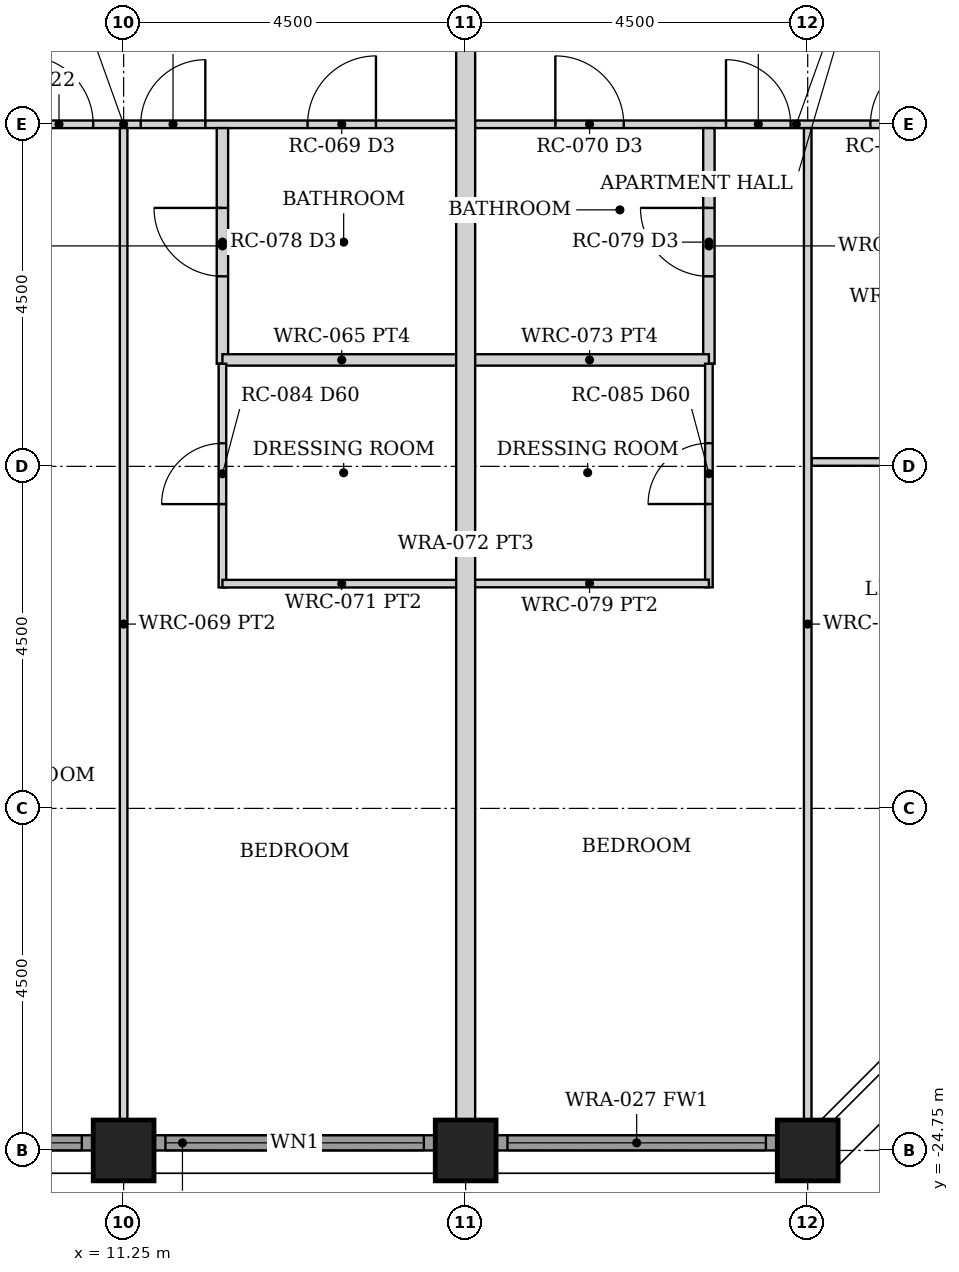
"""IFC4 building model, lengths in metres.
Left out: names, types, materials, properties, quantities, classifications, styles, units other than length and angle.
Written with IfcOpenShell. Run it as: python <this file> out.ifc"""

import sys

from ifc_helpers import new_model, si_unit, direction, frame, frame_2d, origin, origin_2d, place, context, subcontext, project, spatial, rectangle, hollow_rectangle, extrude, element, fill, save


model = new_model("IFC4")
c1 = context("Model", 3, precision=1e-05, world=origin(), true_north=direction((0.0, 1.0)))
c2 = subcontext(c1, "Body", "Model", "MODEL_VIEW")
j1 = project(units=[si_unit("LENGTHUNIT", "METRE"), si_unit("PLANEANGLEUNIT", "RADIAN")], contexts=[c1])
p1 = place(None, origin())
s1 = spatial("IfcSite", under=j1, at=p1, CompositionType="ELEMENT")
p2 = place(p1, origin())
s2 = spatial("IfcBuilding", under=s1, at=p2, CompositionType="ELEMENT")
p3 = place(p2, frame((0.0, 0.0, 47.5)))
s3 = spatial("IfcBuildingStorey", under=s2, at=p3, CompositionType="ELEMENT", Elevation=47.5)
for number, where, z_axis, x_axis in (
    (1, (11.25, -24.75, 0.0), (0.0, 0.0, 1.0), (0.0, 1.0, 0.0)),
    (2, (15.75, -24.75, 0.0), (0.0, 0.0, 1.0), (0.0, 1.0, 0.0)),
    (3, (20.25, -24.75, 0.0), (0.0, 0.0, 1.0), (0.0, 1.0, 0.0)),
):
    element("IfcColumn", number, at=place(p3, frame(where, z_axis=z_axis, x_axis=x_axis)), inside=s3, PredefinedType="COLUMN", context=c2, shape_type="SweptSolid", body=[
        extrude(hollow_rectangle(XDim=0.8, YDim=0.8, WallThickness=0.07, at=origin_2d()), origin(), (0.0, 0.0, 1.0), 3.5),
    ])
p4 = place(p3, frame((7.155, -24.65, 0.0), z_axis=(0.0, 0.0, 1.0), x_axis=(1.0, 0.0, 0.0)))
e4 = element("IfcWall", 4, at=p4, inside=s3, PredefinedType="SOLIDWALL", context=c2, shape_type="SweptSolid", body=[
    extrude(rectangle(XDim=3.69, YDim=0.2, at=frame_2d((1.845, 0.0))), origin(), (0.0, 0.0, 1.0), 2.379),
])
p5 = place(p4, frame((0.145, 0.0, 0.3)))
e5 = element("IfcOpeningElement", 5, at=p5, cuts=e4, PredefinedType="OPENING", context=c2, shape_type="SweptSolid", body=[
    extrude(rectangle(XDim=3.4, YDim=1.929, at=frame_2d((1.7, 0.964))), frame((0.0, 0.11, 0.0), z_axis=(0.0, -1.0, 0.0), x_axis=(1.0, 0.0, 0.0)), (0.0, 0.0, 1.0), 0.22),
])
p6 = place(p3, frame((11.655, -24.65, 0.0), z_axis=(0.0, 0.0, 1.0), x_axis=(1.0, 0.0, 0.0)))
e6 = element("IfcWall", 6, at=p6, inside=s3, PredefinedType="SOLIDWALL", context=c2, shape_type="SweptSolid", body=[
    extrude(rectangle(XDim=3.69, YDim=0.2, at=frame_2d((1.845, 0.0))), origin(), (0.0, 0.0, 1.0), 2.379),
])
p7 = place(p6, frame((0.145, 0.0, 0.3)))
e7 = element("IfcOpeningElement", 7, at=p7, cuts=e6, PredefinedType="OPENING", context=c2, shape_type="SweptSolid", body=[
    extrude(rectangle(XDim=3.4, YDim=1.929, at=frame_2d((1.7, 0.964))), frame((0.0, 0.11, 0.0), z_axis=(0.0, -1.0, 0.0), x_axis=(1.0, 0.0, 0.0)), (0.0, 0.0, 1.0), 0.22),
])
p8 = place(p3, frame((16.155, -24.65, 0.0), z_axis=(0.0, 0.0, 1.0), x_axis=(1.0, 0.0, 0.0)))
e8 = element("IfcWall", 8, at=p8, inside=s3, PredefinedType="SOLIDWALL", context=c2, shape_type="SweptSolid", body=[
    extrude(rectangle(XDim=3.69, YDim=0.2, at=frame_2d((1.845, 0.0))), origin(), (0.0, 0.0, 1.0), 2.379),
])
p9 = place(p8, frame((0.145, 0.0, 0.3)))
e9 = element("IfcOpeningElement", 9, at=p9, cuts=e8, PredefinedType="OPENING", context=c2, shape_type="SweptSolid", body=[
    extrude(rectangle(XDim=3.4, YDim=1.929, at=frame_2d((1.7, 0.964))), frame((0.0, 0.11, 0.0), z_axis=(0.0, -1.0, 0.0), x_axis=(1.0, 0.0, 0.0)), (0.0, 0.0, 1.0), 0.22),
])
p10 = place(p3, frame((6.85, -11.25, 0.0), z_axis=(0.0, 0.0, 1.0), x_axis=(1.0, 0.0, 0.0)))
e10 = element("IfcWall", 10, at=p10, inside=s3, PredefinedType="PARTITIONING", context=c2, shape_type="SweptSolid", body=[
    extrude(rectangle(XDim=8.8, YDim=0.1, at=frame_2d((4.4, 0.0))), origin(), (0.0, 0.0, 1.0), 2.373),
])
p11 = place(p10, frame((0.85, 0.0, 0.0)))
e11 = element("IfcOpeningElement", 11, at=p11, cuts=e10, PredefinedType="OPENING", context=c2, shape_type="SweptSolid", body=[
    extrude(rectangle(XDim=0.9, YDim=2.1, at=frame_2d((0.45, 1.05))), frame((0.0, 0.06, 0.0), z_axis=(0.0, -1.0, 0.0), x_axis=(1.0, 0.0, 0.0)), (0.0, 0.0, 1.0), 0.12),
])
p12 = place(p10, frame((3.1, 0.0, 0.0)))
e12 = element("IfcOpeningElement", 12, at=p12, cuts=e10, PredefinedType="OPENING", context=c2, shape_type="SweptSolid", body=[
    extrude(rectangle(XDim=0.9, YDim=2.1, at=frame_2d((0.45, 1.05))), frame((0.0, 0.06, 0.0), z_axis=(0.0, -1.0, 0.0), x_axis=(1.0, 0.0, 0.0)), (0.0, 0.0, 1.0), 0.12),
])
p13 = place(p10, frame((4.625, 0.0, 0.0)))
e13 = element("IfcOpeningElement", 13, at=p13, cuts=e10, PredefinedType="OPENING", context=c2, shape_type="SweptSolid", body=[
    extrude(rectangle(XDim=0.85, YDim=2.1, at=frame_2d((0.425, 1.05))), frame((0.0, 0.06, 0.0), z_axis=(0.0, -1.0, 0.0), x_axis=(1.0, 0.0, 0.0)), (0.0, 0.0, 1.0), 0.12),
])
p14 = place(p10, frame((6.82, 0.0, 0.0)))
e14 = element("IfcOpeningElement", 14, at=p14, cuts=e10, PredefinedType="OPENING", context=c2, shape_type="SweptSolid", body=[
    extrude(rectangle(XDim=0.9, YDim=2.1, at=frame_2d((0.45, 1.05))), frame((0.0, 0.06, 0.0), z_axis=(0.0, -1.0, 0.0), x_axis=(1.0, 0.0, 0.0)), (0.0, 0.0, 1.0), 0.12),
])
p15 = place(p3, frame((11.25, -24.35, 0.0), z_axis=(0.0, 0.0, 1.0), x_axis=(0.0, 1.0, 0.0)))
e15 = element("IfcWall", 15, at=p15, inside=s3, PredefinedType="PARTITIONING", context=c2, shape_type="SweptSolid", body=[
    extrude(rectangle(XDim=13.05, YDim=0.1, at=frame_2d((6.525, 0.0))), origin(), (0.0, 0.0, 1.0), 2.373),
])
p16 = place(p3, frame((12.55, -14.4, 0.0), z_axis=(0.0, 0.0, 1.0), x_axis=(0.0, 1.0, 0.0)))
e16 = element("IfcWall", 16, at=p16, inside=s3, PredefinedType="PARTITIONING", context=c2, shape_type="SweptSolid", body=[
    extrude(rectangle(XDim=3.1, YDim=0.15, at=frame_2d((1.55, 0.0))), origin(), (0.0, 0.0, 1.0), 2.373),
])
p17 = place(p16, frame((1.15, 0.0, 0.0)))
e17 = element("IfcOpeningElement", 17, at=p17, cuts=e16, PredefinedType="OPENING", context=c2, shape_type="SweptSolid", body=[
    extrude(rectangle(XDim=0.9, YDim=2.1, at=frame_2d((0.45, 1.05))), frame((0.0, 0.085, 0.0), z_axis=(0.0, -1.0, 0.0), x_axis=(1.0, 0.0, 0.0)), (0.0, 0.0, 1.0), 0.17),
])
p18 = place(p3, frame((12.55, -14.35, 0.0), z_axis=(0.0, 0.0, 1.0), x_axis=(1.0, 0.0, 0.0)))
e18 = element("IfcWall", 18, at=p18, inside=s3, PredefinedType="PARTITIONING", context=c2, shape_type="SweptSolid", body=[
    extrude(rectangle(XDim=3.14, YDim=0.15, at=frame_2d((1.57, 0.0))), origin(), (0.0, 0.0, 1.0), 2.373),
])
p19 = place(p3, frame((12.55, -17.344, 0.0), z_axis=(0.0, 0.0, 1.0), x_axis=(0.0, 1.0, 0.0)))
e19 = element("IfcWall", 19, at=p19, inside=s3, PredefinedType="PARTITIONING", context=c2, shape_type="SweptSolid", body=[
    extrude(rectangle(XDim=2.944, YDim=0.1, at=frame_2d((1.472, 0.0))), origin(), (0.0, 0.0, 1.0), 2.373),
])
p20 = place(p19, frame((1.097, 0.0, 0.0)))
e20 = element("IfcOpeningElement", 20, at=p20, cuts=e19, PredefinedType="OPENING", context=c2, shape_type="SweptSolid", body=[
    extrude(rectangle(XDim=0.8, YDim=2.1, at=frame_2d((0.4, 1.05))), frame((0.0, 0.06, 0.0), z_axis=(0.0, -1.0, 0.0), x_axis=(1.0, 0.0, 0.0)), (0.0, 0.0, 1.0), 0.12),
])
p21 = place(p3, frame((12.55, -17.293, 0.0), z_axis=(0.0, 0.0, 1.0), x_axis=(1.0, 0.0, 0.0)))
e21 = element("IfcWall", 21, at=p21, inside=s3, PredefinedType="PARTITIONING", context=c2, shape_type="SweptSolid", body=[
    extrude(rectangle(XDim=3.14, YDim=0.1, at=frame_2d((1.57, 0.0))), origin(), (0.0, 0.0, 1.0), 2.373),
])
p22 = place(p3, frame((15.85, -11.25, 0.0), z_axis=(0.0, 0.0, 1.0), x_axis=(1.0, 0.0, 0.0)))
e22 = element("IfcWall", 22, at=p22, inside=s3, PredefinedType="PARTITIONING", context=c2, shape_type="SweptSolid", body=[
    extrude(rectangle(XDim=8.5, YDim=0.1, at=frame_2d((4.25, 0.0))), origin(), (0.0, 0.0, 1.0), 2.373),
])
p23 = place(p22, frame((5.225, 0.0, 0.0)))
e23 = element("IfcOpeningElement", 23, at=p23, cuts=e22, PredefinedType="OPENING", context=c2, shape_type="SweptSolid", body=[
    extrude(rectangle(XDim=0.9, YDim=2.1, at=frame_2d((0.45, 1.05))), frame((0.0, 0.06, 0.0), z_axis=(0.0, -1.0, 0.0), x_axis=(1.0, 0.0, 0.0)), (0.0, 0.0, 1.0), 0.12),
])
p24 = place(p22, frame((7.25, 0.0, 0.0)))
e24 = element("IfcOpeningElement", 24, at=p24, cuts=e22, PredefinedType="OPENING", context=c2, shape_type="SweptSolid", body=[
    extrude(rectangle(XDim=0.9, YDim=2.1, at=frame_2d((0.45, 1.05))), frame((0.0, 0.06, 0.0), z_axis=(0.0, -1.0, 0.0), x_axis=(1.0, 0.0, 0.0)), (0.0, 0.0, 1.0), 0.12),
])
p25 = place(p22, frame((3.325, 0.0, 0.0)))
e25 = element("IfcOpeningElement", 25, at=p25, cuts=e22, PredefinedType="OPENING", context=c2, shape_type="SweptSolid", body=[
    extrude(rectangle(XDim=0.85, YDim=2.1, at=frame_2d((0.425, 1.05))), frame((0.0, 0.06, 0.0), z_axis=(0.0, -1.0, 0.0), x_axis=(1.0, 0.0, 0.0)), (0.0, 0.0, 1.0), 0.12),
])
p26 = place(p22, frame((1.08, 0.0, 0.0)))
e26 = element("IfcOpeningElement", 26, at=p26, cuts=e22, PredefinedType="OPENING", context=c2, shape_type="SweptSolid", body=[
    extrude(rectangle(XDim=0.9, YDim=2.1, at=frame_2d((0.45, 1.05))), frame((0.0, 0.06, 0.0), z_axis=(0.0, -1.0, 0.0), x_axis=(1.0, 0.0, 0.0)), (0.0, 0.0, 1.0), 0.12),
])
p27 = place(p3, frame((20.3, -15.692, 0.0), z_axis=(0.0, 0.0, 1.0), x_axis=(1.0, 0.0, 0.0)))
e27 = element("IfcWall", 27, at=p27, inside=s3, PredefinedType="PARTITIONING", context=c2, shape_type="SweptSolid", body=[
    extrude(rectangle(XDim=2.5, YDim=0.1, at=frame_2d((1.25, 0.0))), origin(), (0.0, 0.0, 1.0), 2.373),
])
p28 = place(p3, frame((20.25, -24.35, 0.0), z_axis=(0.0, 0.0, 1.0), x_axis=(0.0, 1.0, 0.0)))
e28 = element("IfcWall", 28, at=p28, inside=s3, PredefinedType="PARTITIONING", context=c2, shape_type="SweptSolid", body=[
    extrude(rectangle(XDim=13.05, YDim=0.1, at=frame_2d((6.525, 0.0))), origin(), (0.0, 0.0, 1.0), 2.373),
])
p29 = place(p3, frame((18.95, -14.4, 0.0), z_axis=(0.0, 0.0, 1.0), x_axis=(0.0, 1.0, 0.0)))
e29 = element("IfcWall", 29, at=p29, inside=s3, PredefinedType="PARTITIONING", context=c2, shape_type="SweptSolid", body=[
    extrude(rectangle(XDim=3.1, YDim=0.15, at=frame_2d((1.55, 0.0))), origin(), (0.0, 0.0, 1.0), 2.373),
])
p30 = place(p29, frame((1.15, 0.0, 0.0)))
e30 = element("IfcOpeningElement", 30, at=p30, cuts=e29, PredefinedType="OPENING", context=c2, shape_type="SweptSolid", body=[
    extrude(rectangle(XDim=0.9, YDim=2.1, at=frame_2d((0.45, 1.05))), frame((0.0, 0.085, 0.0), z_axis=(0.0, -1.0, 0.0), x_axis=(1.0, 0.0, 0.0)), (0.0, 0.0, 1.0), 0.17),
])
p31 = place(p3, frame((15.81, -14.35, 0.0), z_axis=(0.0, 0.0, 1.0), x_axis=(1.0, 0.0, 0.0)))
e31 = element("IfcWall", 31, at=p31, inside=s3, PredefinedType="PARTITIONING", context=c2, shape_type="SweptSolid", body=[
    extrude(rectangle(XDim=3.14, YDim=0.15, at=frame_2d((1.57, 0.0))), origin(), (0.0, 0.0, 1.0), 2.373),
])
p32 = place(p3, frame((18.95, -17.341, 0.0), z_axis=(0.0, 0.0, 1.0), x_axis=(0.0, 1.0, 0.0)))
e32 = element("IfcWall", 32, at=p32, inside=s3, PredefinedType="PARTITIONING", context=c2, shape_type="SweptSolid", body=[
    extrude(rectangle(XDim=2.941, YDim=0.1, at=frame_2d((1.47, 0.0))), origin(), (0.0, 0.0, 1.0), 2.373),
])
p33 = place(p32, frame((1.095, 0.0, 0.0)))
e33 = element("IfcOpeningElement", 33, at=p33, cuts=e32, PredefinedType="OPENING", context=c2, shape_type="SweptSolid", body=[
    extrude(rectangle(XDim=0.8, YDim=2.1, at=frame_2d((0.4, 1.05))), frame((0.0, 0.06, 0.0), z_axis=(0.0, -1.0, 0.0), x_axis=(1.0, 0.0, 0.0)), (0.0, 0.0, 1.0), 0.12),
])
p34 = place(p3, frame((15.81, -17.291, 0.0), z_axis=(0.0, 0.0, 1.0), x_axis=(1.0, 0.0, 0.0)))
e34 = element("IfcWall", 34, at=p34, inside=s3, PredefinedType="PARTITIONING", context=c2, shape_type="SweptSolid", body=[
    extrude(rectangle(XDim=3.14, YDim=0.1, at=frame_2d((1.57, 0.0))), origin(), (0.0, 0.0, 1.0), 2.373),
])
p35 = place(p3, frame((15.75, -24.35, 0.0), z_axis=(0.0, 0.0, 1.0), x_axis=(0.0, 1.0, 0.0)))
e35 = element("IfcWall", 35, at=p35, inside=s3, PredefinedType="PARTITIONING", context=c2, shape_type="SweptSolid", body=[
    extrude(rectangle(XDim=15.15, YDim=0.25, at=frame_2d((7.575, 0.0))), origin(), (0.0, 0.0, 1.0), 2.373),
])
p36 = place(p5, origin())
e36 = element("IfcWindow", 36, at=p36, inside=s3, PartitioningType="SINGLE_PANEL", PredefinedType="WINDOW", context=c2, shape_type="SweptSolid", body=[
    extrude(rectangle(XDim=3.4, YDim=1.929, at=frame_2d((1.7, 0.964))), frame((0.0, 0.03, 0.0), z_axis=(0.0, -1.0, 0.0), x_axis=(1.0, 0.0, 0.0)), (0.0, 0.0, 1.0), 0.06),
])
fill(e5, e36)
p37 = place(p7, origin())
e37 = element("IfcWindow", 37, at=p37, inside=s3, PartitioningType="SINGLE_PANEL", PredefinedType="WINDOW", context=c2, shape_type="SweptSolid", body=[
    extrude(rectangle(XDim=3.4, YDim=1.929, at=frame_2d((1.7, 0.964))), frame((0.0, 0.03, 0.0), z_axis=(0.0, -1.0, 0.0), x_axis=(1.0, 0.0, 0.0)), (0.0, 0.0, 1.0), 0.06),
])
fill(e7, e37)
p38 = place(p9, origin())
e38 = element("IfcWindow", 38, at=p38, inside=s3, PartitioningType="SINGLE_PANEL", PredefinedType="WINDOW", context=c2, shape_type="SweptSolid", body=[
    extrude(rectangle(XDim=3.4, YDim=1.929, at=frame_2d((1.7, 0.964))), frame((0.0, 0.03, 0.0), z_axis=(0.0, -1.0, 0.0), x_axis=(1.0, 0.0, 0.0)), (0.0, 0.0, 1.0), 0.06),
])
fill(e9, e38)
p39 = place(p12, origin())
e39 = element("IfcDoor", 39, at=p39, inside=s3, OperationType="SINGLE_SWING_LEFT", PredefinedType="DOOR", context=c2, shape_type="SweptSolid", body=[
    extrude(rectangle(XDim=0.9, YDim=2.1, at=frame_2d((0.45, 1.05))), frame((0.0, 0.025, 0.0), z_axis=(0.0, -1.0, 0.0), x_axis=(1.0, 0.0, 0.0)), (0.0, 0.0, 1.0), 0.05),
])
fill(e12, e39)
p40 = place(p13, origin())
e40 = element("IfcDoor", 40, at=p40, inside=s3, OperationType="SINGLE_SWING_RIGHT", PredefinedType="DOOR", context=c2, shape_type="SweptSolid", body=[
    extrude(rectangle(XDim=0.85, YDim=2.1, at=frame_2d((0.425, 1.05))), frame((0.0, 0.025, 0.0), z_axis=(0.0, -1.0, 0.0), x_axis=(1.0, 0.0, 0.0)), (0.0, 0.0, 1.0), 0.05),
])
fill(e13, e40)
p41 = place(p17, origin())
e41 = element("IfcDoor", 41, at=p41, inside=s3, OperationType="SINGLE_SWING_RIGHT", PredefinedType="DOOR", context=c2, shape_type="SweptSolid", body=[
    extrude(rectangle(XDim=0.9, YDim=2.1, at=frame_2d((0.45, 1.05))), frame((0.0, 0.025, 0.0), z_axis=(0.0, -1.0, 0.0), x_axis=(1.0, 0.0, 0.0)), (0.0, 0.0, 1.0), 0.05),
])
fill(e17, e41)
p42 = place(p14, origin())
e42 = element("IfcDoor", 42, at=p42, inside=s3, OperationType="SINGLE_SWING_RIGHT", PredefinedType="DOOR", context=c2, shape_type="SweptSolid", body=[
    extrude(rectangle(XDim=0.9, YDim=2.1, at=frame_2d((0.45, 1.05))), frame((0.0, 0.025, 0.0), z_axis=(0.0, -1.0, 0.0), x_axis=(1.0, 0.0, 0.0)), (0.0, 0.0, 1.0), 0.05),
])
fill(e14, e42)
p43 = place(p20, origin())
e43 = element("IfcDoor", 43, at=p43, inside=s3, OperationType="SINGLE_SWING_LEFT", PredefinedType="DOOR", context=c2, shape_type="SweptSolid", body=[
    extrude(rectangle(XDim=0.8, YDim=2.1, at=frame_2d((0.4, 1.05))), frame((0.0, 0.025, 0.0), z_axis=(0.0, -1.0, 0.0), x_axis=(1.0, 0.0, 0.0)), (0.0, 0.0, 1.0), 0.05),
])
fill(e20, e43)
p44 = place(p23, origin())
e44 = element("IfcDoor", 44, at=p44, inside=s3, OperationType="SINGLE_SWING_RIGHT", PredefinedType="DOOR", context=c2, shape_type="SweptSolid", body=[
    extrude(rectangle(XDim=0.9, YDim=2.1, at=frame_2d((0.45, 1.05))), frame((0.0, 0.025, 0.0), z_axis=(0.0, -1.0, 0.0), x_axis=(1.0, 0.0, 0.0)), (0.0, 0.0, 1.0), 0.05),
])
fill(e23, e44)
p45 = place(p25, origin())
e45 = element("IfcDoor", 45, at=p45, inside=s3, OperationType="SINGLE_SWING_LEFT", PredefinedType="DOOR", context=c2, shape_type="SweptSolid", body=[
    extrude(rectangle(XDim=0.85, YDim=2.1, at=frame_2d((0.425, 1.05))), frame((0.0, 0.025, 0.0), z_axis=(0.0, -1.0, 0.0), x_axis=(1.0, 0.0, 0.0)), (0.0, 0.0, 1.0), 0.05),
])
fill(e25, e45)
p46 = place(p30, origin())
e46 = element("IfcDoor", 46, at=p46, inside=s3, OperationType="SINGLE_SWING_RIGHT", PredefinedType="DOOR", context=c2, shape_type="SweptSolid", body=[
    extrude(rectangle(XDim=0.9, YDim=2.1, at=frame_2d((0.45, 1.05))), frame((0.0, 0.025, 0.0), z_axis=(0.0, -1.0, 0.0), x_axis=(1.0, 0.0, 0.0)), (0.0, 0.0, 1.0), 0.05),
])
fill(e30, e46)
p47 = place(p26, origin())
e47 = element("IfcDoor", 47, at=p47, inside=s3, OperationType="SINGLE_SWING_LEFT", PredefinedType="DOOR", context=c2, shape_type="SweptSolid", body=[
    extrude(rectangle(XDim=0.9, YDim=2.1, at=frame_2d((0.45, 1.05))), frame((0.0, 0.025, 0.0), z_axis=(0.0, -1.0, 0.0), x_axis=(1.0, 0.0, 0.0)), (0.0, 0.0, 1.0), 0.05),
])
fill(e26, e47)
p48 = place(p33, origin())
e48 = element("IfcDoor", 48, at=p48, inside=s3, OperationType="SINGLE_SWING_LEFT", PredefinedType="DOOR", context=c2, shape_type="SweptSolid", body=[
    extrude(rectangle(XDim=0.8, YDim=2.1, at=frame_2d((0.4, 1.05))), frame((0.0, 0.025, 0.0), z_axis=(0.0, -1.0, 0.0), x_axis=(1.0, 0.0, 0.0)), (0.0, 0.0, 1.0), 0.05),
])
fill(e33, e48)
save(model, sys.argv[1])
